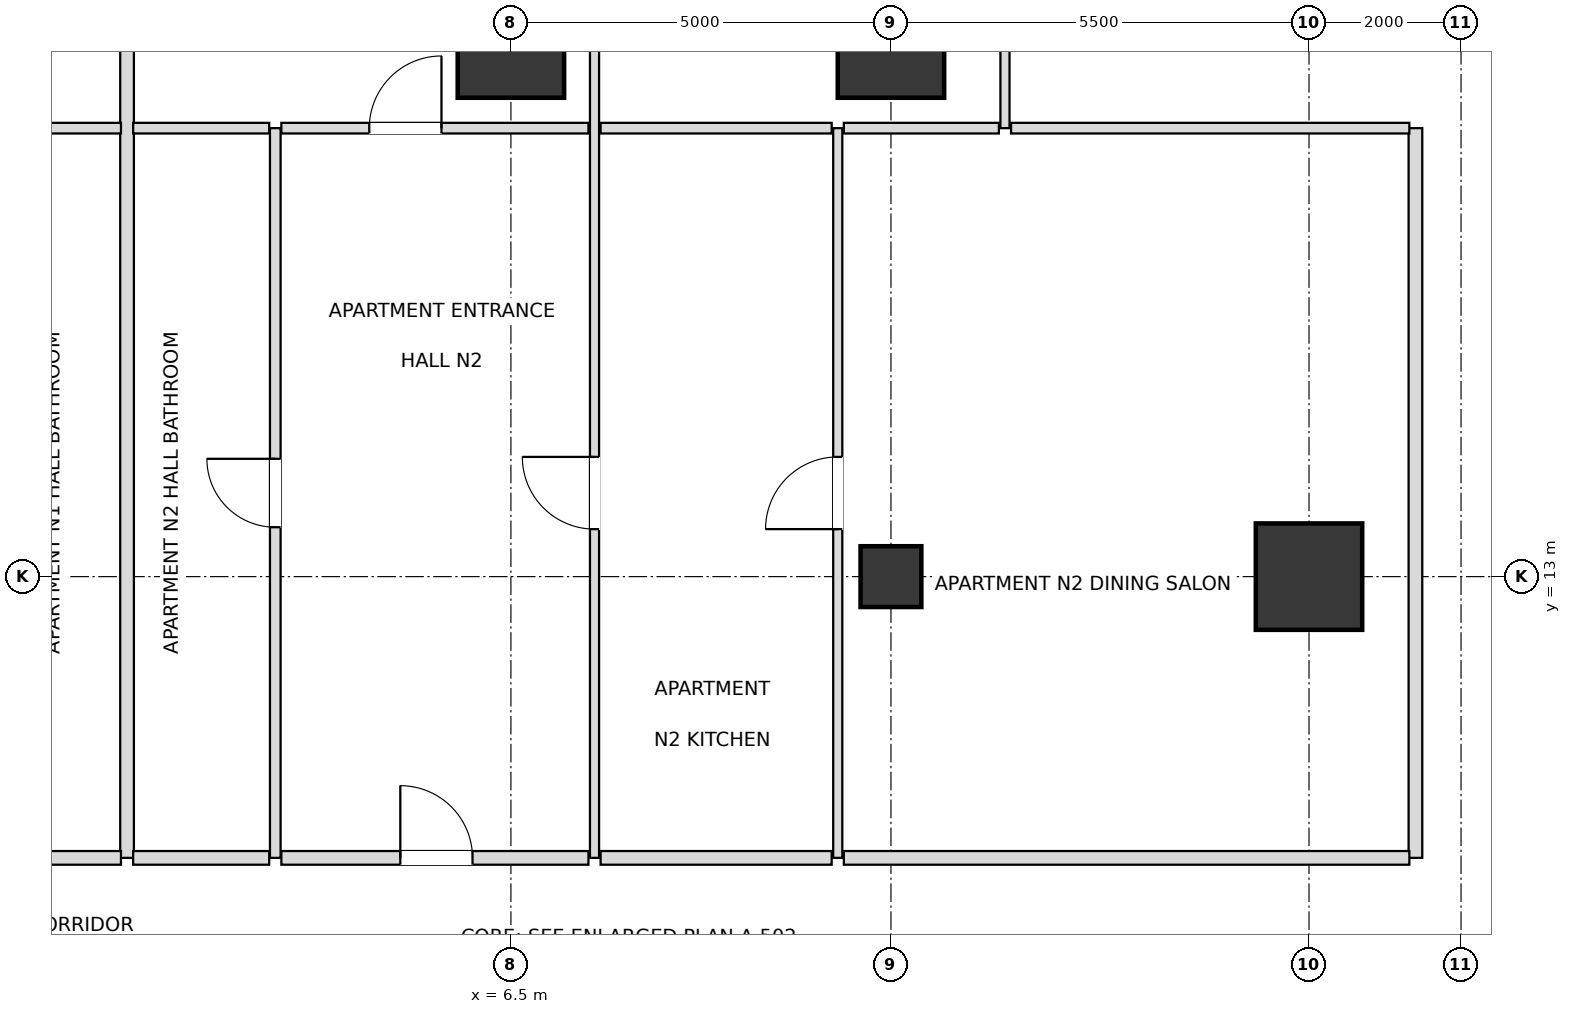
"""IFC4 building model, lengths in metres.
Left out: names, types, materials, properties, quantities, classifications, styles, units other than length and angle.
Written with IfcOpenShell. Run it as: python <this file> out.ifc"""

import sys

from ifc_helpers import new_model, si_unit, direction, frame, frame_2d, origin, origin_2d, place, context, subcontext, project, spatial, rectangle, extrude, element, fill, save


model = new_model("IFC4")
c1 = context("Model", 3, precision=1e-05, world=origin(), true_north=direction((0.0, 1.0)))
c2 = subcontext(c1, "Body", "Model", "MODEL_VIEW")
j1 = project(units=[si_unit("LENGTHUNIT", "METRE"), si_unit("PLANEANGLEUNIT", "RADIAN")], contexts=[c1])
p1 = place(None, origin())
s1 = spatial("IfcSite", under=j1, at=p1, CompositionType="ELEMENT")
p2 = place(p1, origin())
s2 = spatial("IfcBuilding", under=s1, at=p2, CompositionType="ELEMENT")
p3 = place(p2, frame((0.0, 0.0, 32.4)))
s3 = spatial("IfcBuildingStorey", under=s2, at=p3, CompositionType="ELEMENT", Elevation=32.4)
for number, where, z_axis, x_axis in (
    (1, (17.0, 13.0, 0.0), (0.0, 0.0, 1.0), (1.0, 0.0, 0.0)),
    (2, (11.5, 20.0, 0.0), (0.0, 0.0, 1.0), (1.0, 0.0, 0.0)),
    (3, (6.5, 20.0, 0.0), (0.0, 0.0, 1.0), (1.0, 0.0, 0.0)),
):
    element("IfcColumn", number, at=place(p3, frame(where, z_axis=z_axis, x_axis=x_axis)), inside=s3, PredefinedType="USERDEFINED", context=c2, shape_type="SweptSolid", body=[
        extrude(rectangle(XDim=1.4, YDim=1.4, at=origin_2d()), origin(), (0.0, 0.0, 1.0), 3.6),
    ])
p4 = place(p3, frame((11.5, 13.0, 0.0), z_axis=(0.0, 0.0, 1.0), x_axis=(1.0, 0.0, 0.0)))
e4 = element("IfcColumn", 4, at=p4, inside=s3, PredefinedType="COLUMN", context=c2, shape_type="SweptSolid", body=[
    extrude(rectangle(XDim=0.8, YDim=0.8, at=origin_2d()), origin(), (0.0, 0.0, 1.0), 3.6),
])
p5 = place(p3, frame((1.45, 9.3, 0.0), z_axis=(0.0, 0.0, 1.0), x_axis=(0.0, 1.0, 0.0)))
e5 = element("IfcWall", 5, at=p5, inside=s3, PredefinedType="PARTITIONING", context=c2, shape_type="SweptSolid", body=[
    extrude(rectangle(XDim=15.6, YDim=0.18, at=frame_2d((7.8, 0.0))), origin(), (0.0, 0.0, 1.0), 2.816),
])
p6 = place(p3, frame((3.4, 9.3, 0.0), z_axis=(0.0, 0.0, 1.0), x_axis=(0.0, 1.0, 0.0)))
e6 = element("IfcWall", 6, at=p6, inside=s3, PredefinedType="PARTITIONING", context=c2, shape_type="SweptSolid", body=[
    extrude(rectangle(XDim=9.6, YDim=0.14, at=frame_2d((4.8, 0.0))), origin(), (0.0, 0.0, 1.0), 2.948),
])
p7 = place(p6, frame((4.35, 0.0, 0.0)))
e7 = element("IfcOpeningElement", 7, at=p7, cuts=e6, PredefinedType="OPENING", context=c2, shape_type="SweptSolid", body=[
    extrude(rectangle(XDim=0.9, YDim=2.1, at=frame_2d((0.45, 1.05))), frame((0.0, 0.08, 0.0), z_axis=(0.0, -1.0, 0.0), x_axis=(1.0, 0.0, 0.0)), (0.0, 0.0, 1.0), 0.16),
])
p8 = place(p3, frame((7.6, 9.3, 0.0), z_axis=(0.0, 0.0, 1.0), x_axis=(0.0, 1.0, 0.0)))
e8 = element("IfcWall", 8, at=p8, inside=s3, PredefinedType="PARTITIONING", context=c2, shape_type="SweptSolid", body=[
    extrude(rectangle(XDim=15.6, YDim=0.12, at=frame_2d((7.8, 0.0))), origin(), (0.0, 0.0, 1.0), 2.816),
])
p9 = place(p8, frame((4.325, 0.0, 0.0)))
e9 = element("IfcOpeningElement", 9, at=p9, cuts=e8, PredefinedType="OPENING", context=c2, shape_type="SweptSolid", body=[
    extrude(rectangle(XDim=0.95, YDim=2.1, at=frame_2d((0.475, 1.05))), frame((0.0, 0.07, 0.0), z_axis=(0.0, -1.0, 0.0), x_axis=(1.0, 0.0, 0.0)), (0.0, 0.0, 1.0), 0.14),
])
p10 = place(p8, frame((12.15, 0.0, 0.0)))
e10 = element("IfcOpeningElement", 10, at=p10, cuts=e8, PredefinedType="OPENING", context=c2, shape_type="SweptSolid", body=[
    extrude(rectangle(XDim=0.9, YDim=2.1, at=frame_2d((0.45, 1.05))), frame((0.0, 0.07, 0.0), z_axis=(0.0, -1.0, 0.0), x_axis=(1.0, 0.0, 0.0)), (0.0, 0.0, 1.0), 0.14),
])
p11 = place(p3, frame((10.8, 9.3, 0.0), z_axis=(0.0, 0.0, 1.0), x_axis=(0.0, 1.0, 0.0)))
e11 = element("IfcWall", 11, at=p11, inside=s3, PredefinedType="PARTITIONING", context=c2, shape_type="SweptSolid", body=[
    extrude(rectangle(XDim=9.6, YDim=0.12, at=frame_2d((4.8, 0.0))), origin(), (0.0, 0.0, 1.0), 2.816),
])
p12 = place(p11, frame((4.325, 0.0, 0.0)))
e12 = element("IfcOpeningElement", 12, at=p12, cuts=e11, PredefinedType="OPENING", context=c2, shape_type="SweptSolid", body=[
    extrude(rectangle(XDim=0.95, YDim=2.1, at=frame_2d((0.475, 1.05))), frame((0.0, 0.07, 0.0), z_axis=(0.0, -1.0, 0.0), x_axis=(1.0, 0.0, 0.0)), (0.0, 0.0, 1.0), 0.14),
])
p13 = place(p3, frame((13.0, 18.9, 0.0), z_axis=(0.0, 0.0, 1.0), x_axis=(0.0, 1.0, 0.0)))
e13 = element("IfcWall", 13, at=p13, inside=s3, PredefinedType="PARTITIONING", context=c2, shape_type="SweptSolid", body=[
    extrude(rectangle(XDim=6.0, YDim=0.12, at=frame_2d((3.0, 0.0))), origin(), (0.0, 0.0, 1.0), 2.736),
])
p14 = place(p13, frame((2.55, 0.0, 0.0)))
e14 = element("IfcOpeningElement", 14, at=p14, cuts=e13, PredefinedType="OPENING", context=c2, shape_type="SweptSolid", body=[
    extrude(rectangle(XDim=0.9, YDim=2.1, at=frame_2d((0.45, 1.05))), frame((0.0, 0.07, 0.0), z_axis=(0.0, -1.0, 0.0), x_axis=(1.0, 0.0, 0.0)), (0.0, 0.0, 1.0), 0.14),
])
p15 = place(p3, frame((18.4, 9.3, 0.0), z_axis=(0.0, 0.0, 1.0), x_axis=(0.0, 1.0, 0.0)))
e15 = element("IfcWall", 15, at=p15, inside=s3, PredefinedType="PARTITIONING", context=c2, shape_type="SweptSolid", body=[
    extrude(rectangle(XDim=9.6, YDim=0.18, at=frame_2d((4.8, 0.0))), origin(), (0.0, 0.0, 1.0), 2.736),
])
for number, where, z_axis, x_axis in (
    (16, (-0.42, 9.3, 0.0), (0.0, 0.0, 1.0), (1.0, 0.0, 0.0)),
    (17, (1.53, 9.3, 0.0), (0.0, 0.0, 1.0), (1.0, 0.0, 0.0)),
):
    element("IfcWall", number, at=place(p3, frame(where, z_axis=z_axis, x_axis=x_axis)), inside=s3, PredefinedType="PARTITIONING", context=c2, shape_type="SweptSolid", body=[
        extrude(rectangle(XDim=1.79, YDim=0.18, at=frame_2d((0.895, 0.0))), origin(), (0.0, 0.0, 1.0), 3.38),
    ])
p16 = place(p3, frame((3.48, 9.3, 0.0), z_axis=(0.0, 0.0, 1.0), x_axis=(1.0, 0.0, 0.0)))
e18 = element("IfcWall", 18, at=p16, inside=s3, PredefinedType="PARTITIONING", context=c2, shape_type="SweptSolid", body=[
    extrude(rectangle(XDim=4.04, YDim=0.18, at=frame_2d((2.02, 0.0))), origin(), (0.0, 0.0, 1.0), 2.816),
])
p17 = place(p16, frame((1.565, 0.0, 0.0)))
e19 = element("IfcOpeningElement", 19, at=p17, cuts=e18, PredefinedType="OPENING", context=c2, shape_type="SweptSolid", body=[
    extrude(rectangle(XDim=0.95, YDim=2.15, at=frame_2d((0.475, 1.075))), frame((0.0, 0.1, 0.0), z_axis=(0.0, -1.0, 0.0), x_axis=(1.0, 0.0, 0.0)), (0.0, 0.0, 1.0), 0.2),
])
p18 = place(p3, frame((7.68, 9.3, 0.0), z_axis=(0.0, 0.0, 1.0), x_axis=(1.0, 0.0, 0.0)))
e20 = element("IfcWall", 20, at=p18, inside=s3, PredefinedType="PARTITIONING", context=c2, shape_type="SweptSolid", body=[
    extrude(rectangle(XDim=3.04, YDim=0.18, at=frame_2d((1.52, 0.0))), origin(), (0.0, 0.0, 1.0), 3.38),
])
p19 = place(p3, frame((10.88, 9.3, 0.0), z_axis=(0.0, 0.0, 1.0), x_axis=(1.0, 0.0, 0.0)))
e21 = element("IfcWall", 21, at=p19, inside=s3, PredefinedType="PARTITIONING", context=c2, shape_type="SweptSolid", body=[
    extrude(rectangle(XDim=7.44, YDim=0.18, at=frame_2d((3.72, 0.0))), origin(), (0.0, 0.0, 1.0), 2.816),
])
for number, where, z_axis, x_axis in (
    (22, (-0.42, 18.9, 0.0), (0.0, 0.0, 1.0), (1.0, 0.0, 0.0)),
    (23, (1.53, 18.9, 0.0), (0.0, 0.0, 1.0), (1.0, 0.0, 0.0)),
):
    element("IfcWall", number, at=place(p3, frame(where, z_axis=z_axis, x_axis=x_axis)), inside=s3, PredefinedType="PARTITIONING", context=c2, shape_type="SweptSolid", body=[
        extrude(rectangle(XDim=1.79, YDim=0.14, at=frame_2d((0.895, 0.0))), origin(), (0.0, 0.0, 1.0), 3.38),
    ])
p20 = place(p3, frame((3.48, 18.9, 0.0), z_axis=(0.0, 0.0, 1.0), x_axis=(1.0, 0.0, 0.0)))
e24 = element("IfcWall", 24, at=p20, inside=s3, PredefinedType="PARTITIONING", context=c2, shape_type="SweptSolid", body=[
    extrude(rectangle(XDim=4.04, YDim=0.14, at=frame_2d((2.02, 0.0))), origin(), (0.0, 0.0, 1.0), 2.816),
])
p21 = place(p20, frame((1.156, 0.0, 0.0)))
e25 = element("IfcOpeningElement", 25, at=p21, cuts=e24, PredefinedType="OPENING", context=c2, shape_type="SweptSolid", body=[
    extrude(rectangle(XDim=0.95, YDim=2.1, at=frame_2d((0.475, 1.05))), frame((0.0, 0.08, 0.0), z_axis=(0.0, -1.0, 0.0), x_axis=(1.0, 0.0, 0.0)), (0.0, 0.0, 1.0), 0.16),
])
p22 = place(p3, frame((7.68, 18.9, 0.0), z_axis=(0.0, 0.0, 1.0), x_axis=(1.0, 0.0, 0.0)))
e26 = element("IfcWall", 26, at=p22, inside=s3, PredefinedType="PARTITIONING", context=c2, shape_type="SweptSolid", body=[
    extrude(rectangle(XDim=3.04, YDim=0.14, at=frame_2d((1.52, 0.0))), origin(), (0.0, 0.0, 1.0), 3.38),
])
p23 = place(p3, frame((10.88, 18.9, 0.0), z_axis=(0.0, 0.0, 1.0), x_axis=(1.0, 0.0, 0.0)))
e27 = element("IfcWall", 27, at=p23, inside=s3, PredefinedType="PARTITIONING", context=c2, shape_type="SweptSolid", body=[
    extrude(rectangle(XDim=2.04, YDim=0.14, at=frame_2d((1.02, 0.0))), origin(), (0.0, 0.0, 1.0), 2.736),
])
p24 = place(p3, frame((13.08, 18.9, 0.0), z_axis=(0.0, 0.0, 1.0), x_axis=(1.0, 0.0, 0.0)))
e28 = element("IfcWall", 28, at=p24, inside=s3, PredefinedType="PARTITIONING", context=c2, shape_type="SweptSolid", body=[
    extrude(rectangle(XDim=5.24, YDim=0.14, at=frame_2d((2.62, 0.0))), origin(), (0.0, 0.0, 1.0), 2.736),
])
p25 = place(p7, origin())
e29 = element("IfcDoor", 29, at=p25, inside=s3, OperationType="SINGLE_SWING_RIGHT", PredefinedType="DOOR", context=c2, shape_type="SweptSolid", body=[
    extrude(rectangle(XDim=0.9, YDim=2.1, at=frame_2d((0.45, 1.05))), frame((0.0, 0.025, 0.0), z_axis=(0.0, -1.0, 0.0), x_axis=(1.0, 0.0, 0.0)), (0.0, 0.0, 1.0), 0.05),
])
fill(e7, e29)
p26 = place(p17, origin())
e30 = element("IfcDoor", 30, at=p26, inside=s3, OperationType="SINGLE_SWING_LEFT", PredefinedType="DOOR", context=c2, shape_type="SweptSolid", body=[
    extrude(rectangle(XDim=0.95, YDim=2.15, at=frame_2d((0.475, 1.075))), frame((0.0, 0.025, 0.0), z_axis=(0.0, -1.0, 0.0), x_axis=(1.0, 0.0, 0.0)), (0.0, 0.0, 1.0), 0.05),
])
fill(e19, e30)
p27 = place(p9, origin())
e31 = element("IfcDoor", 31, at=p27, inside=s3, OperationType="SINGLE_SWING_RIGHT", PredefinedType="DOOR", context=c2, shape_type="SweptSolid", body=[
    extrude(rectangle(XDim=0.95, YDim=2.1, at=frame_2d((0.475, 1.05))), frame((0.0, 0.025, 0.0), z_axis=(0.0, -1.0, 0.0), x_axis=(1.0, 0.0, 0.0)), (0.0, 0.0, 1.0), 0.05),
])
fill(e9, e31)
p28 = place(p12, origin())
e32 = element("IfcDoor", 32, at=p28, inside=s3, OperationType="SINGLE_SWING_LEFT", PredefinedType="DOOR", context=c2, shape_type="SweptSolid", body=[
    extrude(rectangle(XDim=0.95, YDim=2.1, at=frame_2d((0.475, 1.05))), frame((0.0, 0.025, 0.0), z_axis=(0.0, -1.0, 0.0), x_axis=(1.0, 0.0, 0.0)), (0.0, 0.0, 1.0), 0.05),
])
fill(e12, e32)
p29 = place(p21, origin())
e33 = element("IfcDoor", 33, at=p29, inside=s3, OperationType="SINGLE_SWING_RIGHT", PredefinedType="DOOR", context=c2, shape_type="SweptSolid", body=[
    extrude(rectangle(XDim=0.95, YDim=2.1, at=frame_2d((0.475, 1.05))), frame((0.0, 0.025, 0.0), z_axis=(0.0, -1.0, 0.0), x_axis=(1.0, 0.0, 0.0)), (0.0, 0.0, 1.0), 0.05),
])
fill(e25, e33)
save(model, sys.argv[1])
